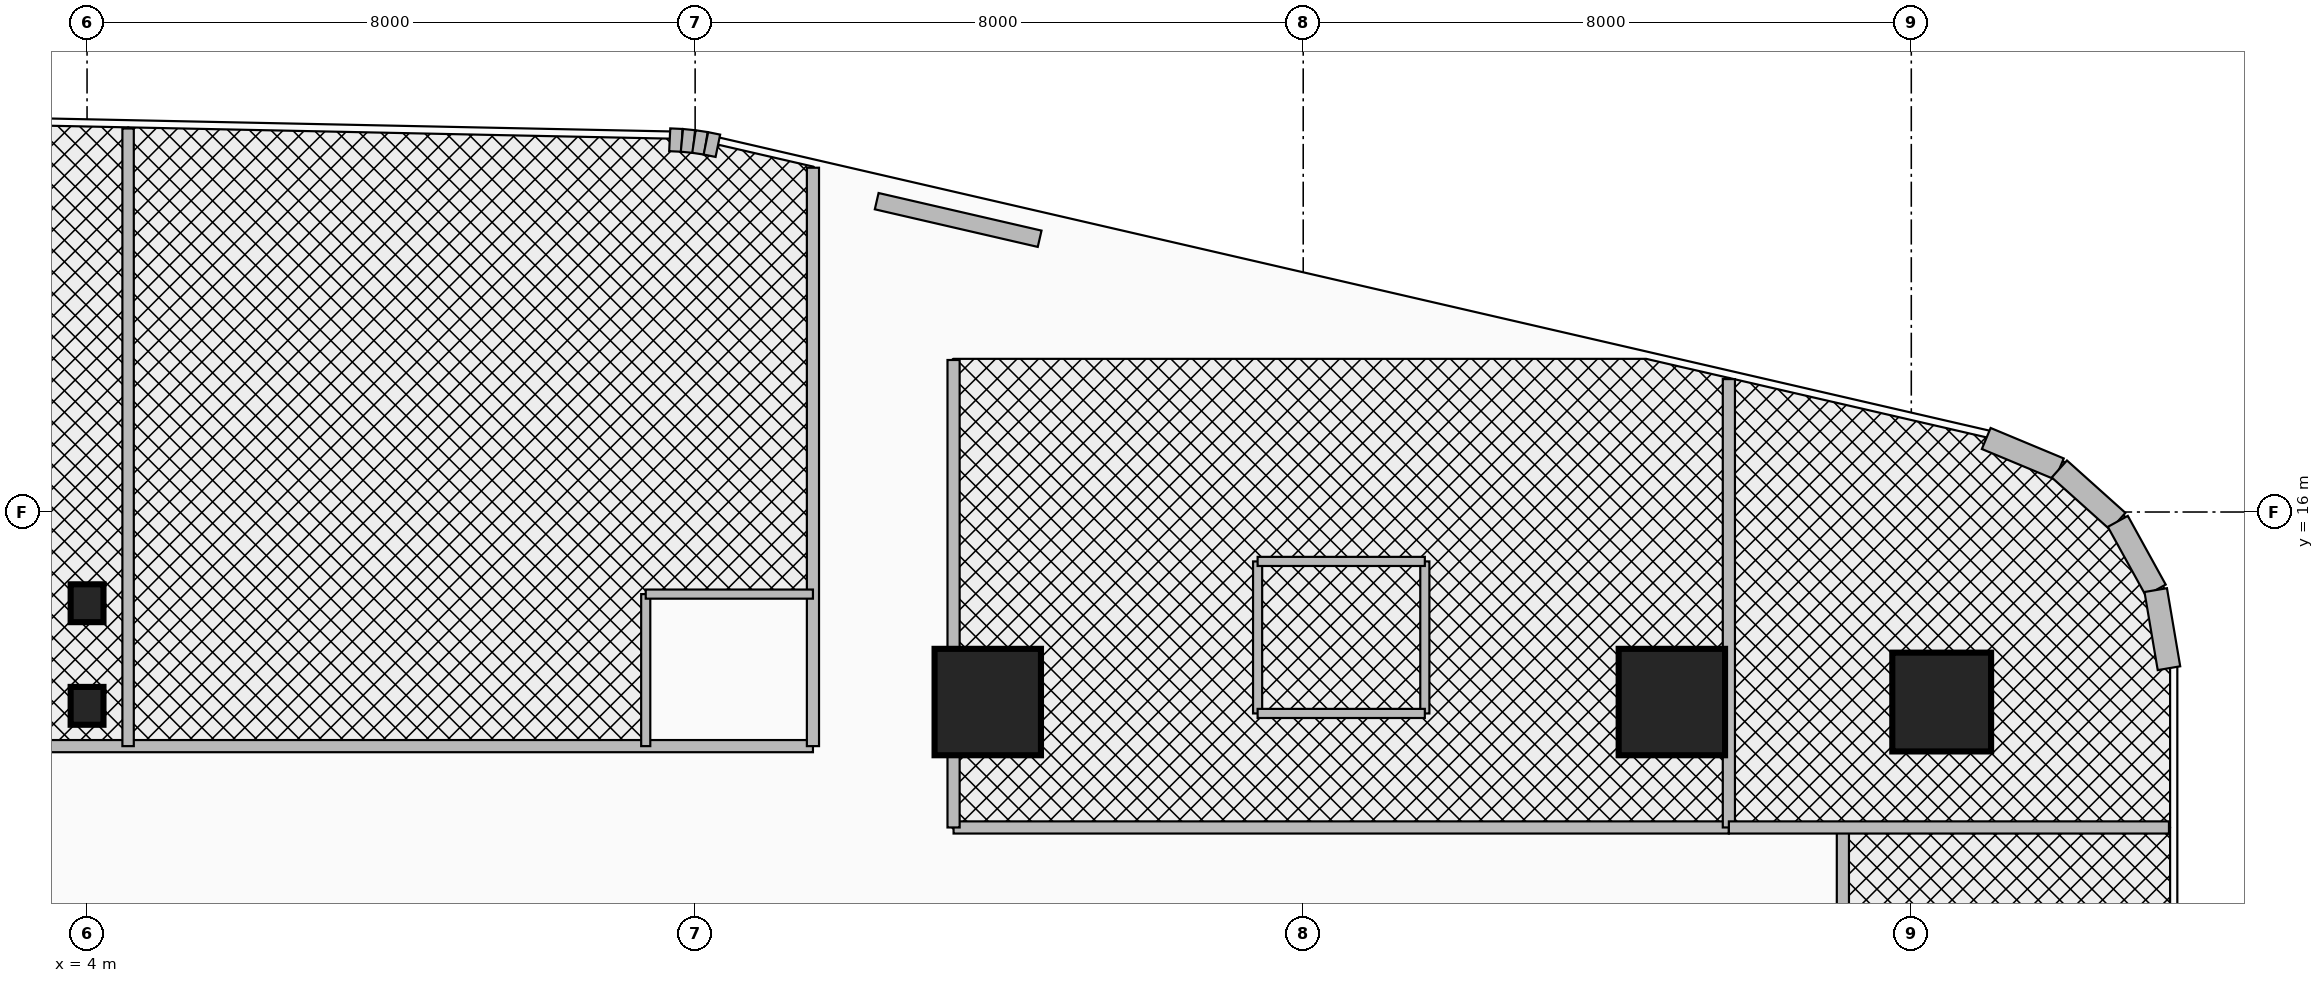
"""IFC4 building model, lengths in metres.
Left out: names, types, materials, properties, quantities, classifications, styles, units other than length and angle.
Written with IfcOpenShell. Run it as: python <this file> out.ifc"""

import sys

from ifc_helpers import new_model, si_unit, direction, frame, frame_2d, origin, origin_2d, place, context, subcontext, project, spatial, rectangle, circle, i_section, extrude, source, transform, mapped, element, fill, save


model = new_model("IFC4")
c1 = context("Model", 3, precision=1e-05, world=origin(), true_north=direction((0.0, 1.0)))
c2 = subcontext(c1, "Body", "Model", "MODEL_VIEW")
j1 = project(units=[si_unit("LENGTHUNIT", "METRE"), si_unit("PLANEANGLEUNIT", "RADIAN")], contexts=[c1])
p1 = place(None, origin())
s1 = spatial("IfcSite", under=j1, at=p1, CompositionType="ELEMENT")
p2 = place(p1, origin())
s2 = spatial("IfcBuilding", under=s1, at=p2, CompositionType="ELEMENT")
p3 = place(p2, frame((0.0, 0.0, 26.0)))
s3 = spatial("IfcBuildingStorey", under=s2, at=p3, CompositionType="ELEMENT", Elevation=26.0)
m1 = source(origin(), c2, "Body", "SweptSolid", [
    extrude(rectangle(XDim=1.4, YDim=1.4, at=origin_2d()), origin(), (0.0, 0.0, 1.0), 3.7),
])
for number, where, z_axis, x_axis in (
    (1, (15.85, 13.5, 0.0), (0.0, 0.0, 1.0), (1.0, 0.0, 0.0)),
    (2, (24.85, 13.5, 0.0), (0.0, 0.0, 1.0), (1.0, 0.0, 0.0)),
):
    element("IfcColumn", number, at=place(p3, frame(where, z_axis=z_axis, x_axis=x_axis)), inside=s3, PredefinedType="COLUMN", context=c2, shape_type="MappedRepresentation", body=[
        mapped(m1, transform((0.0, 0.0, 0.0), x_axis=(1.0, 0.0, 0.0), y_axis=(0.0, 1.0, 0.0), z_axis=(0.0, 0.0, 1.0), scale=1.0)),
    ])
m2 = source(origin(), c2, "Body", "SweptSolid", [
    extrude(circle(Radius=0.65, at=origin_2d()), origin(), (0.0, 0.0, 1.0), 3.7),
])
p4 = place(p3, frame((28.4, 13.5, 0.0), z_axis=(0.0, 0.0, 1.0), x_axis=(1.0, 0.0, 0.0)))
e3 = element("IfcColumn", 3, at=p4, inside=s3, PredefinedType="COLUMN", context=c2, shape_type="MappedRepresentation", body=[
    mapped(m2, transform((0.0, 0.0, 0.0), x_axis=(1.0, 0.0, 0.0), y_axis=(0.0, 1.0, 0.0), z_axis=(0.0, 0.0, 1.0), scale=1.0)),
])
m3 = source(origin(), c2, "Body", "SweptSolid", [
    extrude(i_section(OverallWidth=0.432, OverallDepth=0.498, WebThickness=0.056, FlangeThickness=0.089, at=origin_2d()), origin(), (0.0, 0.0, 1.0), 3.7),
])
for number, where, z_axis, x_axis in (
    (4, (4.0, 13.45, 0.0), (0.0, 0.0, 1.0), (1.0, 0.0, 0.0)),
    (5, (4.0, 14.8, 0.0), (0.0, 0.0, 1.0), (1.0, 0.0, 0.0)),
):
    element("IfcColumn", number, at=place(p3, frame(where, z_axis=z_axis, x_axis=x_axis)), inside=s3, PredefinedType="COLUMN", context=c2, shape_type="MappedRepresentation", body=[
        mapped(m3, transform((0.0, 0.0, 0.0), x_axis=(1.0, 0.0, 0.0), y_axis=(0.0, 1.0, 0.0), z_axis=(0.0, 0.0, 1.0), scale=1.0)),
    ])
p5 = place(p3, frame((11.666, 20.897, 0.0), z_axis=(0.0, 0.0, 1.0), x_axis=(0.998885297239, -0.047203421059, 0.0)))
e6 = element("IfcWall", 6, at=p5, inside=s3, PredefinedType="SOLIDWALL", context=c2, shape_type="SweptSolid", body=[
    extrude(rectangle(XDim=0.16, YDim=0.3, at=frame_2d((0.08, 0.0))), origin(), (0.0, 0.0, 1.0), 3.46),
])
p6 = place(p3, frame((11.826, 20.889, 0.0), z_axis=(0.0, 0.0, 1.0), x_axis=(0.995172891136, -0.098137234257, 0.0)))
e7 = element("IfcWall", 7, at=p6, inside=s3, PredefinedType="SOLIDWALL", context=c2, shape_type="SweptSolid", body=[
    extrude(rectangle(XDim=0.159, YDim=0.3, at=frame_2d((0.08, 0.0))), origin(), (0.0, 0.0, 1.0), 3.46),
])
p7 = place(p3, frame((11.984, 20.874, 0.0), z_axis=(0.0, 0.0, 1.0), x_axis=(0.988846069207, -0.148941100486, 0.0)))
e8 = element("IfcWall", 8, at=p7, inside=s3, PredefinedType="SOLIDWALL", context=c2, shape_type="SweptSolid", body=[
    extrude(rectangle(XDim=0.159, YDim=0.3, at=frame_2d((0.08, 0.0))), origin(), (0.0, 0.0, 1.0), 3.46),
])
p8 = place(p3, frame((12.142, 20.85, 0.0), z_axis=(0.0, 0.0, 1.0), x_axis=(0.979991950448, -0.19903712482, 0.0)))
e9 = element("IfcWall", 9, at=p8, inside=s3, PredefinedType="SOLIDWALL", context=c2, shape_type="SweptSolid", body=[
    extrude(rectangle(XDim=0.161, YDim=0.3, at=frame_2d((0.08, 0.0))), origin(), (0.0, 0.0, 1.0), 3.46),
])
p9 = place(p3, frame((14.389, 20.09, 0.0), z_axis=(0.0, 0.0, 1.0), x_axis=(0.974400545997, -0.224818984875, 0.0)))
e10 = element("IfcWall", 10, at=p9, inside=s3, PredefinedType="SOLIDWALL", context=c2, shape_type="SweptSolid", body=[
    extrude(rectangle(XDim=2.2, YDim=0.22, at=frame_2d((1.1, 0.0))), origin(), (0.0, 0.0, 1.0), 3.46),
])
p10 = place(p9, frame((0.65, 0.0, 0.95)))
e11 = element("IfcOpeningElement", 11, at=p10, cuts=e10, PredefinedType="OPENING", context=c2, shape_type="SweptSolid", body=[
    extrude(rectangle(XDim=0.9, YDim=1.3, at=frame_2d((0.45, 0.65))), frame((0.0, 0.125, 0.0), z_axis=(0.0, -1.0, 0.0), x_axis=(1.0, 0.0, 0.0)), (0.0, 0.0, 1.0), 0.25),
])
p11 = place(p3, frame((28.986, 16.967, 0.0), z_axis=(0.0, 0.0, 1.0), x_axis=(0.923083852684, -0.384598753136, 0.0)))
e12 = element("IfcWall", 12, at=p11, inside=s3, PredefinedType="SOLIDWALL", context=c2, shape_type="SweptSolid", body=[
    extrude(rectangle(XDim=1.042, YDim=0.3, at=frame_2d((0.521, 0.0))), origin(), (0.0, 0.0, 1.0), 3.46),
])
p12 = place(p3, frame((29.948, 16.566, 0.0), z_axis=(0.0, 0.0, 1.0), x_axis=(0.744585645533, -0.66752694063, 0.0)))
e13 = element("IfcWall", 13, at=p12, inside=s3, PredefinedType="SOLIDWALL", context=c2, shape_type="SweptSolid", body=[
    extrude(rectangle(XDim=1.033, YDim=0.3, at=frame_2d((0.517, 0.0))), origin(), (0.0, 0.0, 1.0), 3.46),
])
p13 = place(p3, frame((30.717, 15.877, 0.0), z_axis=(0.0, 0.0, 1.0), x_axis=(0.482971098131, -0.875636293429, 0.0)))
e14 = element("IfcWall", 14, at=p13, inside=s3, PredefinedType="SOLIDWALL", context=c2, shape_type="SweptSolid", body=[
    extrude(rectangle(XDim=1.033, YDim=0.3, at=frame_2d((0.516, 0.0))), origin(), (0.0, 0.0, 1.0), 3.46),
])
p14 = place(p3, frame((31.216, 14.973, 0.0), z_axis=(0.0, 0.0, 1.0), x_axis=(0.167019462117, -0.985953598946, 0.0)))
e15 = element("IfcWall", 15, at=p14, inside=s3, PredefinedType="SOLIDWALL", context=c2, shape_type="SweptSolid", body=[
    extrude(rectangle(XDim=1.042, YDim=0.3, at=frame_2d((0.521, 0.0))), origin(), (0.0, 0.0, 1.0), 3.46),
])
p15 = place(p3, frame((-31.89, 12.92, 0.0), z_axis=(0.0, 0.0, 1.0), x_axis=(1.0, 0.0, 0.0)))
e16 = element("IfcWall", 16, at=p15, inside=s3, PredefinedType="PARTITIONING", context=c2, shape_type="SweptSolid", body=[
    extrude(rectangle(XDim=45.44, YDim=0.16, at=frame_2d((22.72, 0.0))), origin(), (0.0, 0.0, 1.0), 2.583),
])
p16 = place(p15, frame((4.225, 0.0, 0.0)))
e17 = element("IfcOpeningElement", 17, at=p16, cuts=e16, PredefinedType="OPENING", context=c2, shape_type="SweptSolid", body=[
    extrude(rectangle(XDim=0.95, YDim=2.15, at=frame_2d((0.475, 1.075))), frame((0.0, 0.095, 0.0), z_axis=(0.0, -1.0, 0.0), x_axis=(1.0, 0.0, 0.0)), (0.0, 0.0, 1.0), 0.19),
])
p17 = place(p15, frame((13.43, 0.0, 0.0)))
e18 = element("IfcOpeningElement", 18, at=p17, cuts=e16, PredefinedType="OPENING", context=c2, shape_type="SweptSolid", body=[
    extrude(rectangle(XDim=0.95, YDim=2.15, at=frame_2d((0.475, 1.075))), frame((0.0, 0.095, 0.0), z_axis=(0.0, -1.0, 0.0), x_axis=(1.0, 0.0, 0.0)), (0.0, 0.0, 1.0), 0.19),
])
p18 = place(p15, frame((20.31, 0.0, 0.0)))
e19 = element("IfcOpeningElement", 19, at=p18, cuts=e16, PredefinedType="OPENING", context=c2, shape_type="SweptSolid", body=[
    extrude(rectangle(XDim=0.95, YDim=2.15, at=frame_2d((0.475, 1.075))), frame((0.0, 0.095, 0.0), z_axis=(0.0, -1.0, 0.0), x_axis=(1.0, 0.0, 0.0)), (0.0, 0.0, 1.0), 0.19),
])
p19 = place(p15, frame((25.517, 0.0, 0.0)))
e20 = element("IfcOpeningElement", 20, at=p19, cuts=e16, PredefinedType="OPENING", context=c2, shape_type="SweptSolid", body=[
    extrude(rectangle(XDim=0.95, YDim=2.15, at=frame_2d((0.475, 1.075))), frame((0.0, 0.095, 0.0), z_axis=(0.0, -1.0, 0.0), x_axis=(1.0, 0.0, 0.0)), (0.0, 0.0, 1.0), 0.19),
])
p20 = place(p15, frame((28.373, 0.0, 0.0)))
e21 = element("IfcOpeningElement", 21, at=p20, cuts=e16, PredefinedType="OPENING", context=c2, shape_type="SweptSolid", body=[
    extrude(rectangle(XDim=0.95, YDim=2.15, at=frame_2d((0.475, 1.075))), frame((0.0, 0.095, 0.0), z_axis=(0.0, -1.0, 0.0), x_axis=(1.0, 0.0, 0.0)), (0.0, 0.0, 1.0), 0.19),
])
p21 = place(p15, frame((34.527, 0.0, 0.0)))
e22 = element("IfcOpeningElement", 22, at=p21, cuts=e16, PredefinedType="OPENING", context=c2, shape_type="SweptSolid", body=[
    extrude(rectangle(XDim=0.95, YDim=2.15, at=frame_2d((0.475, 1.075))), frame((0.0, 0.095, 0.0), z_axis=(0.0, -1.0, 0.0), x_axis=(1.0, 0.0, 0.0)), (0.0, 0.0, 1.0), 0.19),
])
p22 = place(p15, frame((39.36, 0.0, 0.0)))
e23 = element("IfcOpeningElement", 23, at=p22, cuts=e16, PredefinedType="OPENING", context=c2, shape_type="SweptSolid", body=[
    extrude(rectangle(XDim=0.95, YDim=2.15, at=frame_2d((0.475, 1.075))), frame((0.0, 0.095, 0.0), z_axis=(0.0, -1.0, 0.0), x_axis=(1.0, 0.0, 0.0)), (0.0, 0.0, 1.0), 0.19),
])
p23 = place(p3, frame((13.55, 12.92, 0.0), z_axis=(0.0, 0.0, 1.0), x_axis=(0.0, 1.0, 0.0)))
e24 = element("IfcWall", 24, at=p23, inside=s3, PredefinedType="PARTITIONING", context=c2, shape_type="SweptSolid", body=[
    extrude(rectangle(XDim=7.609, YDim=0.16, at=frame_2d((3.805, 0.0))), origin(), (0.0, 0.0, 1.0), 2.583),
])
p24 = place(p3, frame((4.54, 12.92, 0.0), z_axis=(0.0, 0.0, 1.0), x_axis=(0.0, 1.0, 0.0)))
e25 = element("IfcWall", 25, at=p24, inside=s3, PredefinedType="PARTITIONING", context=c2, shape_type="SweptSolid", body=[
    extrude(rectangle(XDim=8.125, YDim=0.15, at=frame_2d((4.063, 0.0))), origin(), (0.0, 0.0, 1.0), 2.583),
])
p25 = place(p3, frame((11.35, 12.92, 0.0), z_axis=(0.0, 0.0, 1.0), x_axis=(0.0, 1.0, 0.0)))
e26 = element("IfcWall", 26, at=p25, inside=s3, PredefinedType="PARTITIONING", context=c2, shape_type="SweptSolid", body=[
    extrude(rectangle(XDim=2.0, YDim=0.12, at=frame_2d((1.0, 0.0))), origin(), (0.0, 0.0, 1.0), 2.583),
])
p26 = place(p3, frame((11.35, 14.92, 0.0), z_axis=(0.0, 0.0, 1.0), x_axis=(1.0, 0.0, 0.0)))
e27 = element("IfcWall", 27, at=p26, inside=s3, PredefinedType="PARTITIONING", context=c2, shape_type="SweptSolid", body=[
    extrude(rectangle(XDim=2.2, YDim=0.12, at=frame_2d((1.1, 0.0))), origin(), (0.0, 0.0, 1.0), 3.46),
])
p27 = place(p26, frame((0.675, 0.0, 0.0)))
e28 = element("IfcOpeningElement", 28, at=p27, cuts=e27, PredefinedType="OPENING", context=c2, shape_type="SweptSolid", body=[
    extrude(rectangle(XDim=0.85, YDim=2.1, at=frame_2d((0.425, 1.05))), frame((0.0, 0.075, 0.0), z_axis=(0.0, -1.0, 0.0), x_axis=(1.0, 0.0, 0.0)), (0.0, 0.0, 1.0), 0.15),
])
p28 = place(p3, frame((15.4, 11.85, 0.0), z_axis=(0.0, 0.0, 1.0), x_axis=(1.0, 0.0, 0.0)))
e29 = element("IfcWall", 29, at=p28, inside=s3, PredefinedType="PARTITIONING", context=c2, shape_type="SweptSolid", body=[
    extrude(rectangle(XDim=10.2, YDim=0.16, at=frame_2d((5.1, 0.0))), origin(), (0.0, 0.0, 1.0), 2.834),
])
p29 = place(p28, frame((4.625, 0.0, 0.0)))
e30 = element("IfcOpeningElement", 30, at=p29, cuts=e29, PredefinedType="OPENING", context=c2, shape_type="SweptSolid", body=[
    extrude(rectangle(XDim=0.95, YDim=2.15, at=frame_2d((0.475, 1.075))), frame((0.0, 0.095, 0.0), z_axis=(0.0, -1.0, 0.0), x_axis=(1.0, 0.0, 0.0)), (0.0, 0.0, 1.0), 0.19),
])
p30 = place(p3, frame((15.4, 11.85, 0.0), z_axis=(0.0, 0.0, 1.0), x_axis=(0.0, 1.0, 0.0)))
e31 = element("IfcWall", 31, at=p30, inside=s3, PredefinedType="PARTITIONING", context=c2, shape_type="SweptSolid", body=[
    extrude(rectangle(XDim=6.15, YDim=0.16, at=frame_2d((3.075, 0.0))), origin(), (0.0, 0.0, 1.0), 2.583),
])
p31 = place(p3, frame((25.6, 11.85, 0.0), z_axis=(0.0, 0.0, 1.0), x_axis=(0.0, 1.0, 0.0)))
e32 = element("IfcWall", 32, at=p31, inside=s3, PredefinedType="PARTITIONING", context=c2, shape_type="SweptSolid", body=[
    extrude(rectangle(XDim=5.898, YDim=0.16, at=frame_2d((2.949, 0.0))), origin(), (0.0, 0.0, 1.0), 2.583),
])
for number, where, z_axis, x_axis in (
    (33, (19.4, 13.35, 0.0), (0.0, 0.0, 1.0), (0.0, 1.0, 0.0)),
    (34, (21.6, 13.35, 0.0), (0.0, 0.0, 1.0), (0.0, 1.0, 0.0)),
):
    element("IfcWall", number, at=place(p3, frame(where, z_axis=z_axis, x_axis=x_axis)), inside=s3, PredefinedType="PARTITIONING", context=c2, shape_type="SweptSolid", body=[
        extrude(rectangle(XDim=2.0, YDim=0.12, at=frame_2d((1.0, 0.0))), origin(), (0.0, 0.0, 1.0), 2.583),
    ])
p32 = place(p3, frame((19.4, 15.35, 0.0), z_axis=(0.0, 0.0, 1.0), x_axis=(1.0, 0.0, 0.0)))
e35 = element("IfcWall", 35, at=p32, inside=s3, PredefinedType="PARTITIONING", context=c2, shape_type="SweptSolid", body=[
    extrude(rectangle(XDim=2.2, YDim=0.12, at=frame_2d((1.1, 0.0))), origin(), (0.0, 0.0, 1.0), 3.46),
])
p33 = place(p3, frame((19.4, 13.35, 0.0), z_axis=(0.0, 0.0, 1.0), x_axis=(1.0, 0.0, 0.0)))
e36 = element("IfcWall", 36, at=p33, inside=s3, PredefinedType="PARTITIONING", context=c2, shape_type="SweptSolid", body=[
    extrude(rectangle(XDim=2.2, YDim=0.12, at=frame_2d((1.1, 0.0))), origin(), (0.0, 0.0, 1.0), 2.583),
])
p34 = place(p33, frame((0.675, 0.0, 0.0)))
e37 = element("IfcOpeningElement", 37, at=p34, cuts=e36, PredefinedType="OPENING", context=c2, shape_type="SweptSolid", body=[
    extrude(rectangle(XDim=0.85, YDim=2.1, at=frame_2d((0.425, 1.05))), frame((0.0, 0.075, 0.0), z_axis=(0.0, -1.0, 0.0), x_axis=(1.0, 0.0, 0.0)), (0.0, 0.0, 1.0), 0.15),
])
p35 = place(p3, frame((27.1, -13.89, 0.0), z_axis=(0.0, 0.0, 1.0), x_axis=(0.0, 1.0, 0.0)))
e38 = element("IfcWall", 38, at=p35, inside=s3, PredefinedType="PARTITIONING", context=c2, shape_type="SweptSolid", body=[
    extrude(rectangle(XDim=25.74, YDim=0.16, at=frame_2d((12.87, 0.0))), origin(), (0.0, 0.0, 1.0), 2.583),
])
p36 = place(p35, frame((2.62, 0.0, 0.0)))
e39 = element("IfcOpeningElement", 39, at=p36, cuts=e38, PredefinedType="OPENING", context=c2, shape_type="SweptSolid", body=[
    extrude(rectangle(XDim=0.95, YDim=2.15, at=frame_2d((0.475, 1.075))), frame((0.0, 0.095, 0.0), z_axis=(0.0, -1.0, 0.0), x_axis=(1.0, 0.0, 0.0)), (0.0, 0.0, 1.0), 0.19),
])
p37 = place(p35, frame((8.484, 0.0, 0.0)))
e40 = element("IfcOpeningElement", 40, at=p37, cuts=e38, PredefinedType="OPENING", context=c2, shape_type="SweptSolid", body=[
    extrude(rectangle(XDim=0.95, YDim=2.15, at=frame_2d((0.475, 1.075))), frame((0.0, 0.095, 0.0), z_axis=(0.0, -1.0, 0.0), x_axis=(1.0, 0.0, 0.0)), (0.0, 0.0, 1.0), 0.19),
])
p38 = place(p35, frame((14.197, 0.0, 0.0)))
e41 = element("IfcOpeningElement", 41, at=p38, cuts=e38, PredefinedType="OPENING", context=c2, shape_type="SweptSolid", body=[
    extrude(rectangle(XDim=0.95, YDim=2.15, at=frame_2d((0.475, 1.075))), frame((0.0, 0.095, 0.0), z_axis=(0.0, -1.0, 0.0), x_axis=(1.0, 0.0, 0.0)), (0.0, 0.0, 1.0), 0.19),
])
p39 = place(p35, frame((21.648, 0.0, 0.0)))
e42 = element("IfcOpeningElement", 42, at=p39, cuts=e38, PredefinedType="OPENING", context=c2, shape_type="SweptSolid", body=[
    extrude(rectangle(XDim=0.95, YDim=2.15, at=frame_2d((0.475, 1.075))), frame((0.0, 0.095, 0.0), z_axis=(0.0, -1.0, 0.0), x_axis=(1.0, 0.0, 0.0)), (0.0, 0.0, 1.0), 0.19),
])
p40 = place(p3, frame((25.6, 11.85, 0.0), z_axis=(0.0, 0.0, 1.0), x_axis=(1.0, 0.0, 0.0)))
e43 = element("IfcWall", 43, at=p40, inside=s3, PredefinedType="PARTITIONING", context=c2, shape_type="SweptSolid", body=[
    extrude(rectangle(XDim=5.79, YDim=0.16, at=frame_2d((2.895, 0.0))), origin(), (0.0, 0.0, 1.0), 2.896),
])
p41 = place(p40, frame((0.3, 0.0, 0.0)))
e44 = element("IfcOpeningElement", 44, at=p41, cuts=e43, PredefinedType="OPENING", context=c2, shape_type="SweptSolid", body=[
    extrude(rectangle(XDim=0.9, YDim=2.1, at=frame_2d((0.45, 1.05))), frame((0.0, 0.095, 0.0), z_axis=(0.0, -1.0, 0.0), x_axis=(1.0, 0.0, 0.0)), (0.0, 0.0, 1.0), 0.19),
])
p42 = place(p10, origin())
e45 = element("IfcWindow", 45, at=p42, inside=s3, PartitioningType="SINGLE_PANEL", PredefinedType="WINDOW", context=c2, shape_type="SweptSolid", body=[
    extrude(rectangle(XDim=0.9, YDim=1.3, at=frame_2d((0.45, 0.65))), frame((0.0, 0.03, 0.0), z_axis=(0.0, -1.0, 0.0), x_axis=(1.0, 0.0, 0.0)), (0.0, 0.0, 1.0), 0.06),
])
fill(e11, e45)
p43 = place(p21, frame((0.95, 0.0, 0.0), z_axis=(0.0, 0.0, 1.0), x_axis=(-1.0, 0.0, 0.0)))
e46 = element("IfcDoor", 46, at=p43, inside=s3, OperationType="SINGLE_SWING_LEFT", PredefinedType="DOOR", context=c2, shape_type="SweptSolid", body=[
    extrude(rectangle(XDim=0.95, YDim=2.15, at=frame_2d((0.475, 1.075))), frame((0.0, 0.025, 0.0), z_axis=(0.0, -1.0, 0.0), x_axis=(1.0, 0.0, 0.0)), (0.0, 0.0, 1.0), 0.05),
])
fill(e22, e46)
p44 = place(p22, frame((0.95, 0.0, 0.0), z_axis=(0.0, 0.0, 1.0), x_axis=(-1.0, 0.0, 0.0)))
e47 = element("IfcDoor", 47, at=p44, inside=s3, OperationType="SINGLE_SWING_LEFT", PredefinedType="DOOR", context=c2, shape_type="SweptSolid", body=[
    extrude(rectangle(XDim=0.95, YDim=2.15, at=frame_2d((0.475, 1.075))), frame((0.0, 0.025, 0.0), z_axis=(0.0, -1.0, 0.0), x_axis=(1.0, 0.0, 0.0)), (0.0, 0.0, 1.0), 0.05),
])
fill(e23, e47)
p45 = place(p27, origin())
e48 = element("IfcDoor", 48, at=p45, inside=s3, OperationType="SINGLE_SWING_RIGHT", PredefinedType="DOOR", context=c2, shape_type="SweptSolid", body=[
    extrude(rectangle(XDim=0.85, YDim=2.1, at=frame_2d((0.425, 1.05))), frame((0.0, 0.025, 0.0), z_axis=(0.0, -1.0, 0.0), x_axis=(1.0, 0.0, 0.0)), (0.0, 0.0, 1.0), 0.05),
])
fill(e28, e48)
p46 = place(p29, frame((0.95, 0.0, 0.0), z_axis=(0.0, 0.0, 1.0), x_axis=(-1.0, 0.0, 0.0)))
e49 = element("IfcDoor", 49, at=p46, inside=s3, OperationType="SINGLE_SWING_LEFT", PredefinedType="DOOR", context=c2, shape_type="SweptSolid", body=[
    extrude(rectangle(XDim=0.95, YDim=2.15, at=frame_2d((0.475, 1.075))), frame((0.0, 0.025, 0.0), z_axis=(0.0, -1.0, 0.0), x_axis=(1.0, 0.0, 0.0)), (0.0, 0.0, 1.0), 0.05),
])
fill(e30, e49)
p47 = place(p34, origin())
e50 = element("IfcDoor", 50, at=p47, inside=s3, OperationType="SINGLE_SWING_RIGHT", PredefinedType="DOOR", context=c2, shape_type="SweptSolid", body=[
    extrude(rectangle(XDim=0.85, YDim=2.1, at=frame_2d((0.425, 1.05))), frame((0.0, 0.025, 0.0), z_axis=(0.0, -1.0, 0.0), x_axis=(1.0, 0.0, 0.0)), (0.0, 0.0, 1.0), 0.05),
])
fill(e37, e50)
p48 = place(p41, origin())
e51 = element("IfcDoor", 51, at=p48, inside=s3, OperationType="SINGLE_SWING_LEFT", PredefinedType="DOOR", context=c2, shape_type="SweptSolid", body=[
    extrude(rectangle(XDim=0.9, YDim=2.1, at=frame_2d((0.45, 1.05))), frame((0.0, 0.025, 0.0), z_axis=(0.0, -1.0, 0.0), x_axis=(1.0, 0.0, 0.0)), (0.0, 0.0, 1.0), 0.05),
])
fill(e44, e51)
save(model, sys.argv[1])
